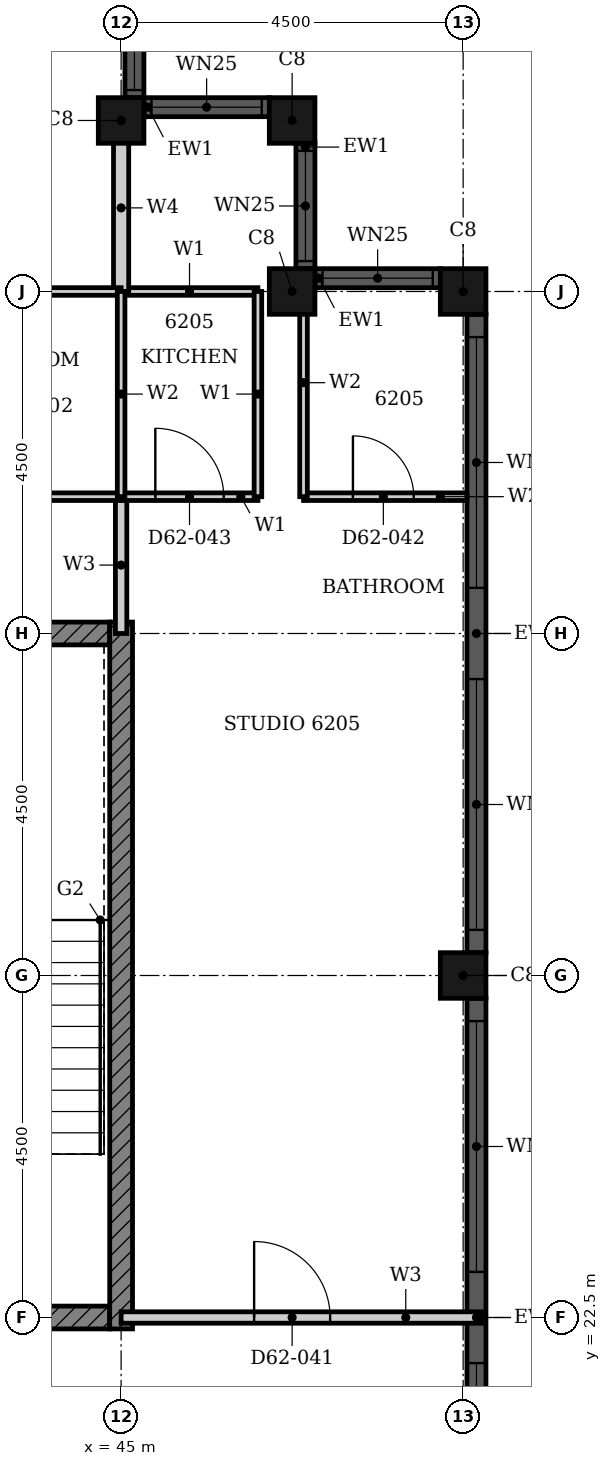
"""IFC4 building model, lengths in metres.
Left out: names, types, materials, properties, quantities, classifications, styles, units other than length and angle.
Written with IfcOpenShell. Run it as: python <this file> out.ifc"""

import sys

from ifc_helpers import new_model, si_unit, direction, frame, frame_2d, origin, origin_2d, place, context, subcontext, project, spatial, rectangle, hollow_rectangle, extrude, element, fill, save


model = new_model("IFC4")
c1 = context("Model", 3, precision=1e-05, world=origin(), true_north=direction((0.0, 1.0)))
c2 = subcontext(c1, "Body", "Model", "MODEL_VIEW")
j1 = project(units=[si_unit("LENGTHUNIT", "METRE"), si_unit("PLANEANGLEUNIT", "RADIAN")], contexts=[c1])
p1 = place(None, origin())
s1 = spatial("IfcSite", under=j1, at=p1, CompositionType="ELEMENT")
p2 = place(p1, origin())
s2 = spatial("IfcBuilding", under=s1, at=p2, CompositionType="ELEMENT")
p3 = place(p2, frame((0.0, 0.0, 245.3)))
s3 = spatial("IfcBuildingStorey", under=s2, at=p3, CompositionType="ELEMENT", Elevation=245.3)
for number, where, z_axis, x_axis in (
    (1, (49.5, 27.0, 0.0), (0.0, 0.0, 1.0), (1.0, 0.0, 0.0)),
    (2, (49.5, 36.0, 0.0), (0.0, 0.0, 1.0), (1.0, 0.0, 0.0)),
    (3, (47.25, 36.0, 0.0), (0.0, 0.0, 1.0), (1.0, 0.0, 0.0)),
    (4, (47.25, 38.25, 0.0), (0.0, 0.0, 1.0), (1.0, 0.0, 0.0)),
    (5, (45.0, 38.25, 0.0), (0.0, 0.0, 1.0), (1.0, 0.0, 0.0)),
):
    element("IfcColumn", number, at=place(p3, frame(where, z_axis=z_axis, x_axis=x_axis)), inside=s3, PredefinedType="COLUMN", context=c2, shape_type="SweptSolid", body=[
        extrude(hollow_rectangle(XDim=0.6, YDim=0.6, WallThickness=0.02, at=origin_2d()), origin(), (0.0, 0.0, 1.0), 3.7),
    ])
p4 = place(p3, frame((49.675, 18.3, 0.0), z_axis=(0.0, 0.0, 1.0), x_axis=(0.0, 1.0, 0.0)))
e6 = element("IfcWall", 6, at=p4, inside=s3, PredefinedType="SOLIDWALL", context=c2, shape_type="SweptSolid", body=[
    extrude(rectangle(XDim=8.4, YDim=0.25, at=frame_2d((4.2, 0.0))), origin(), (0.0, 0.0, 1.0), 3.7),
])
p5 = place(p4, frame((0.3, 0.0, 0.45)))
e7 = element("IfcOpeningElement", 7, at=p5, cuts=e6, PredefinedType="OPENING", context=c2, shape_type="SweptSolid", body=[
    extrude(rectangle(XDim=3.3, YDim=2.3, at=frame_2d((1.65, 1.15))), frame((0.0, 0.135, 0.0), z_axis=(0.0, -1.0, 0.0), x_axis=(1.0, 0.0, 0.0)), (0.0, 0.0, 1.0), 0.27),
])
p6 = place(p4, frame((4.8, 0.0, 0.45)))
e8 = element("IfcOpeningElement", 8, at=p6, cuts=e6, PredefinedType="OPENING", context=c2, shape_type="SweptSolid", body=[
    extrude(rectangle(XDim=3.3, YDim=2.3, at=frame_2d((1.65, 1.15))), frame((0.0, 0.135, 0.0), z_axis=(0.0, -1.0, 0.0), x_axis=(1.0, 0.0, 0.0)), (0.0, 0.0, 1.0), 0.27),
])
p7 = place(p3, frame((49.675, 27.3, 0.0), z_axis=(0.0, 0.0, 1.0), x_axis=(0.0, 1.0, 0.0)))
e9 = element("IfcWall", 9, at=p7, inside=s3, PredefinedType="SOLIDWALL", context=c2, shape_type="SweptSolid", body=[
    extrude(rectangle(XDim=8.4, YDim=0.25, at=frame_2d((4.2, 0.0))), origin(), (0.0, 0.0, 1.0), 3.7),
])
p8 = place(p7, frame((0.3, 0.0, 0.45)))
e10 = element("IfcOpeningElement", 10, at=p8, cuts=e9, PredefinedType="OPENING", context=c2, shape_type="SweptSolid", body=[
    extrude(rectangle(XDim=3.3, YDim=2.3, at=frame_2d((1.65, 1.15))), frame((0.0, 0.135, 0.0), z_axis=(0.0, -1.0, 0.0), x_axis=(1.0, 0.0, 0.0)), (0.0, 0.0, 1.0), 0.27),
])
p9 = place(p7, frame((4.8, 0.0, 0.45)))
e11 = element("IfcOpeningElement", 11, at=p9, cuts=e9, PredefinedType="OPENING", context=c2, shape_type="SweptSolid", body=[
    extrude(rectangle(XDim=3.3, YDim=2.3, at=frame_2d((1.65, 1.15))), frame((0.0, 0.135, 0.0), z_axis=(0.0, -1.0, 0.0), x_axis=(1.0, 0.0, 0.0)), (0.0, 0.0, 1.0), 0.27),
])
p10 = place(p3, frame((49.2, 36.175, 0.0), z_axis=(0.0, 0.0, 1.0), x_axis=(-1.0, 0.0, 0.0)))
e12 = element("IfcWall", 12, at=p10, inside=s3, PredefinedType="SOLIDWALL", context=c2, shape_type="SweptSolid", body=[
    extrude(rectangle(XDim=1.65, YDim=0.25, at=frame_2d((0.825, 0.0))), origin(), (0.0, 0.0, 1.0), 3.7),
])
p11 = place(p10, frame((0.1, 0.0, 0.9)))
e13 = element("IfcOpeningElement", 13, at=p11, cuts=e12, PredefinedType="OPENING", context=c2, shape_type="SweptSolid", body=[
    extrude(rectangle(XDim=1.45, YDim=1.85, at=frame_2d((0.725, 0.925))), frame((0.0, 0.135, 0.0), z_axis=(0.0, -1.0, 0.0), x_axis=(1.0, 0.0, 0.0)), (0.0, 0.0, 1.0), 0.27),
])
p12 = place(p3, frame((47.425, 36.3, 0.0), z_axis=(0.0, 0.0, 1.0), x_axis=(0.0, 1.0, 0.0)))
e14 = element("IfcWall", 14, at=p12, inside=s3, PredefinedType="SOLIDWALL", context=c2, shape_type="SweptSolid", body=[
    extrude(rectangle(XDim=1.65, YDim=0.25, at=frame_2d((0.825, 0.0))), origin(), (0.0, 0.0, 1.0), 3.7),
])
p13 = place(p12, frame((0.1, 0.0, 0.9)))
e15 = element("IfcOpeningElement", 15, at=p13, cuts=e14, PredefinedType="OPENING", context=c2, shape_type="SweptSolid", body=[
    extrude(rectangle(XDim=1.45, YDim=1.85, at=frame_2d((0.725, 0.925))), frame((0.0, 0.135, 0.0), z_axis=(0.0, -1.0, 0.0), x_axis=(1.0, 0.0, 0.0)), (0.0, 0.0, 1.0), 0.27),
])
p14 = place(p3, frame((46.95, 38.425, 0.0), z_axis=(0.0, 0.0, 1.0), x_axis=(-1.0, 0.0, 0.0)))
e16 = element("IfcWall", 16, at=p14, inside=s3, PredefinedType="SOLIDWALL", context=c2, shape_type="SweptSolid", body=[
    extrude(rectangle(XDim=1.65, YDim=0.25, at=frame_2d((0.825, 0.0))), origin(), (0.0, 0.0, 1.0), 3.7),
])
p15 = place(p14, frame((0.1, 0.0, 0.9)))
e17 = element("IfcOpeningElement", 17, at=p15, cuts=e16, PredefinedType="OPENING", context=c2, shape_type="SweptSolid", body=[
    extrude(rectangle(XDim=1.45, YDim=1.85, at=frame_2d((0.725, 0.925))), frame((0.0, 0.135, 0.0), z_axis=(0.0, -1.0, 0.0), x_axis=(1.0, 0.0, 0.0)), (0.0, 0.0, 1.0), 0.27),
])
p16 = place(p3, frame((45.175, 38.55, 0.0), z_axis=(0.0, 0.0, 1.0), x_axis=(0.0, 1.0, 0.0)))
e18 = element("IfcWall", 18, at=p16, inside=s3, PredefinedType="SOLIDWALL", context=c2, shape_type="SweptSolid", body=[
    extrude(rectangle(XDim=1.65, YDim=0.25, at=frame_2d((0.825, 0.0))), origin(), (0.0, 0.0, 1.0), 3.7),
])
p17 = place(p16, frame((0.1, 0.0, 0.9)))
e19 = element("IfcOpeningElement", 19, at=p17, cuts=e18, PredefinedType="OPENING", context=c2, shape_type="SweptSolid", body=[
    extrude(rectangle(XDim=1.45, YDim=1.85, at=frame_2d((0.725, 0.925))), frame((0.0, 0.135, 0.0), z_axis=(0.0, -1.0, 0.0), x_axis=(1.0, 0.0, 0.0)), (0.0, 0.0, 1.0), 0.27),
])
p18 = place(p3, frame((30.339, 22.5, 0.0), z_axis=(0.0, 0.0, 1.0), x_axis=(1.0, 0.0, 0.0)))
e20 = element("IfcWall", 20, at=p18, inside=s3, PredefinedType="SHEAR", context=c2, shape_type="SweptSolid", body=[
    extrude(rectangle(XDim=14.511, YDim=0.3, at=frame_2d((7.255, 0.0))), origin(), (0.0, 0.0, 1.0), 3.4),
])
p19 = place(p18, frame((7.975, 0.0, 0.0)))
e21 = element("IfcOpeningElement", 21, at=p19, cuts=e20, PredefinedType="OPENING", context=c2, shape_type="SweptSolid", body=[
    extrude(rectangle(XDim=1.8, YDim=2.1, at=frame_2d((0.9, 1.05))), frame((0.0, 0.16, 0.0), z_axis=(0.0, -1.0, 0.0), x_axis=(1.0, 0.0, 0.0)), (0.0, 0.0, 1.0), 0.32),
])
p20 = place(p3, frame((40.625, 31.5, 0.0), z_axis=(0.0, 0.0, 1.0), x_axis=(1.0, 0.0, 0.0)))
e22 = element("IfcWall", 22, at=p20, inside=s3, PredefinedType="SHEAR", context=c2, shape_type="SweptSolid", body=[
    extrude(rectangle(XDim=4.225, YDim=0.3, at=frame_2d((2.113, 0.0))), origin(), (0.0, 0.0, 1.0), 3.4),
])
p21 = place(p3, frame((45.0, 22.35, 0.0), z_axis=(0.0, 0.0, 1.0), x_axis=(0.0, 1.0, 0.0)))
e23 = element("IfcWall", 23, at=p21, inside=s3, PredefinedType="SHEAR", context=c2, shape_type="SweptSolid", body=[
    extrude(rectangle(XDim=9.3, YDim=0.3, at=frame_2d((4.65, 0.0))), origin(), (0.0, 0.0, 1.0), 3.4),
])
p22 = place(p3, frame((45.0, 22.5, 0.0), z_axis=(0.0, 0.0, 1.0), x_axis=(1.0, 0.0, 0.0)))
e24 = element("IfcWall", 24, at=p22, inside=s3, PredefinedType="PARTITIONING", context=c2, shape_type="SweptSolid", body=[
    extrude(rectangle(XDim=4.74, YDim=0.15, at=frame_2d((2.37, 0.0))), origin(), (0.0, 0.0, 1.0), 3.4),
])
p23 = place(p22, frame((1.75, 0.0, 0.0)))
e25 = element("IfcOpeningElement", 25, at=p23, cuts=e24, PredefinedType="OPENING", context=c2, shape_type="SweptSolid", body=[
    extrude(rectangle(XDim=1.0, YDim=2.2, at=frame_2d((0.5, 1.1))), frame((0.0, 0.085, 0.0), z_axis=(0.0, -1.0, 0.0), x_axis=(1.0, 0.0, 0.0)), (0.0, 0.0, 1.0), 0.17),
])
p24 = place(p3, frame((45.0, 31.5, 0.0), z_axis=(0.0, 0.0, 1.0), x_axis=(0.0, 1.0, 0.0)))
e26 = element("IfcWall", 26, at=p24, inside=s3, PredefinedType="PARTITIONING", context=c2, shape_type="SweptSolid", body=[
    extrude(rectangle(XDim=1.8, YDim=0.15, at=frame_2d((0.9, 0.0))), origin(), (0.0, 0.0, 1.0), 3.4),
])
p25 = place(p3, frame((45.0, 33.3, 0.0), z_axis=(0.0, 0.0, 1.0), x_axis=(1.0, 0.0, 0.0)))
e27 = element("IfcWall", 27, at=p25, inside=s3, PredefinedType="PARTITIONING", context=c2, shape_type="SweptSolid", body=[
    extrude(rectangle(XDim=1.8, YDim=0.1, at=frame_2d((0.9, 0.0))), origin(), (0.0, 0.0, 1.0), 3.4),
])
p26 = place(p25, frame((0.45, 0.0, 0.0)))
e28 = element("IfcOpeningElement", 28, at=p26, cuts=e27, PredefinedType="OPENING", context=c2, shape_type="SweptSolid", body=[
    extrude(rectangle(XDim=0.9, YDim=2.1, at=frame_2d((0.45, 1.05))), frame((0.0, 0.06, 0.0), z_axis=(0.0, -1.0, 0.0), x_axis=(1.0, 0.0, 0.0)), (0.0, 0.0, 1.0), 0.12),
])
p27 = place(p3, frame((45.0, 36.0, 0.0), z_axis=(0.0, 0.0, 1.0), x_axis=(1.0, 0.0, 0.0)))
e29 = element("IfcWall", 29, at=p27, inside=s3, PredefinedType="PARTITIONING", context=c2, shape_type="SweptSolid", body=[
    extrude(rectangle(XDim=1.8, YDim=0.1, at=frame_2d((0.9, 0.0))), origin(), (0.0, 0.0, 1.0), 3.4),
])
p28 = place(p3, frame((46.8, 33.3, 0.0), z_axis=(0.0, 0.0, 1.0), x_axis=(0.0, 1.0, 0.0)))
e30 = element("IfcWall", 30, at=p28, inside=s3, PredefinedType="PARTITIONING", context=c2, shape_type="SweptSolid", body=[
    extrude(rectangle(XDim=2.7, YDim=0.1, at=frame_2d((1.35, 0.0))), origin(), (0.0, 0.0, 1.0), 3.4),
])
p29 = place(p3, frame((45.0, 36.0, 0.0), z_axis=(0.0, 0.0, 1.0), x_axis=(0.0, 1.0, 0.0)))
e31 = element("IfcWall", 31, at=p29, inside=s3, PredefinedType="PARTITIONING", context=c2, shape_type="SweptSolid", body=[
    extrude(rectangle(XDim=2.2, YDim=0.2, at=frame_2d((1.1, 0.0))), origin(), (0.0, 0.0, 1.0), 3.4),
])
p30 = place(p3, frame((42.0, 33.3, 0.0), z_axis=(0.0, 0.0, 1.0), x_axis=(1.0, 0.0, 0.0)))
e32 = element("IfcWall", 32, at=p30, inside=s3, PredefinedType="PARTITIONING", context=c2, shape_type="SweptSolid", body=[
    extrude(rectangle(XDim=3.0, YDim=0.1, at=frame_2d((1.5, 0.0))), origin(), (0.0, 0.0, 1.0), 3.4),
])
p31 = place(p3, frame((47.4, 33.3, 0.0), z_axis=(0.0, 0.0, 1.0), x_axis=(1.0, 0.0, 0.0)))
e33 = element("IfcWall", 33, at=p31, inside=s3, PredefinedType="PARTITIONING", context=c2, shape_type="SweptSolid", body=[
    extrude(rectangle(XDim=2.15, YDim=0.1, at=frame_2d((1.075, 0.0))), origin(), (0.0, 0.0, 1.0), 3.4),
])
p32 = place(p31, frame((0.65, 0.0, 0.0)))
e34 = element("IfcOpeningElement", 34, at=p32, cuts=e33, PredefinedType="OPENING", context=c2, shape_type="SweptSolid", body=[
    extrude(rectangle(XDim=0.8, YDim=2.1, at=frame_2d((0.4, 1.05))), frame((0.0, 0.06, 0.0), z_axis=(0.0, -1.0, 0.0), x_axis=(1.0, 0.0, 0.0)), (0.0, 0.0, 1.0), 0.12),
])
p33 = place(p3, frame((42.0, 36.0, 0.0), z_axis=(0.0, 0.0, 1.0), x_axis=(1.0, 0.0, 0.0)))
e35 = element("IfcWall", 35, at=p33, inside=s3, PredefinedType="PARTITIONING", context=c2, shape_type="SweptSolid", body=[
    extrude(rectangle(XDim=3.0, YDim=0.1, at=frame_2d((1.5, 0.0))), origin(), (0.0, 0.0, 1.0), 3.4),
])
p34 = place(p3, frame((45.0, 33.3, 0.0), z_axis=(0.0, 0.0, 1.0), x_axis=(0.0, 1.0, 0.0)))
e36 = element("IfcWall", 36, at=p34, inside=s3, PredefinedType="PARTITIONING", context=c2, shape_type="SweptSolid", body=[
    extrude(rectangle(XDim=2.7, YDim=0.1, at=frame_2d((1.35, 0.0))), origin(), (0.0, 0.0, 1.0), 3.4),
])
p35 = place(p3, frame((47.4, 33.3, 0.0), z_axis=(0.0, 0.0, 1.0), x_axis=(0.0, 1.0, 0.0)))
e37 = element("IfcWall", 37, at=p35, inside=s3, PredefinedType="PARTITIONING", context=c2, shape_type="SweptSolid", body=[
    extrude(rectangle(XDim=3.0, YDim=0.1, at=frame_2d((1.5, 0.0))), origin(), (0.0, 0.0, 1.0), 3.4),
])
p36 = place(p5, origin())
e38 = element("IfcWindow", 38, at=p36, inside=s3, PartitioningType="SINGLE_PANEL", PredefinedType="WINDOW", context=c2, shape_type="SweptSolid", body=[
    extrude(rectangle(XDim=3.3, YDim=2.3, at=frame_2d((1.65, 1.15))), frame((0.0, 0.03, 0.0), z_axis=(0.0, -1.0, 0.0), x_axis=(1.0, 0.0, 0.0)), (0.0, 0.0, 1.0), 0.06),
])
fill(e7, e38)
p37 = place(p6, origin())
e39 = element("IfcWindow", 39, at=p37, inside=s3, PartitioningType="SINGLE_PANEL", PredefinedType="WINDOW", context=c2, shape_type="SweptSolid", body=[
    extrude(rectangle(XDim=3.3, YDim=2.3, at=frame_2d((1.65, 1.15))), frame((0.0, 0.03, 0.0), z_axis=(0.0, -1.0, 0.0), x_axis=(1.0, 0.0, 0.0)), (0.0, 0.0, 1.0), 0.06),
])
fill(e8, e39)
p38 = place(p8, origin())
e40 = element("IfcWindow", 40, at=p38, inside=s3, PartitioningType="SINGLE_PANEL", PredefinedType="WINDOW", context=c2, shape_type="SweptSolid", body=[
    extrude(rectangle(XDim=3.3, YDim=2.3, at=frame_2d((1.65, 1.15))), frame((0.0, 0.03, 0.0), z_axis=(0.0, -1.0, 0.0), x_axis=(1.0, 0.0, 0.0)), (0.0, 0.0, 1.0), 0.06),
])
fill(e10, e40)
p39 = place(p9, origin())
e41 = element("IfcWindow", 41, at=p39, inside=s3, PartitioningType="SINGLE_PANEL", PredefinedType="WINDOW", context=c2, shape_type="SweptSolid", body=[
    extrude(rectangle(XDim=3.3, YDim=2.3, at=frame_2d((1.65, 1.15))), frame((0.0, 0.03, 0.0), z_axis=(0.0, -1.0, 0.0), x_axis=(1.0, 0.0, 0.0)), (0.0, 0.0, 1.0), 0.06),
])
fill(e11, e41)
p40 = place(p11, origin())
e42 = element("IfcWindow", 42, at=p40, inside=s3, PartitioningType="SINGLE_PANEL", PredefinedType="WINDOW", context=c2, shape_type="SweptSolid", body=[
    extrude(rectangle(XDim=1.45, YDim=1.85, at=frame_2d((0.725, 0.925))), frame((0.0, 0.03, 0.0), z_axis=(0.0, -1.0, 0.0), x_axis=(1.0, 0.0, 0.0)), (0.0, 0.0, 1.0), 0.06),
])
fill(e13, e42)
p41 = place(p13, origin())
e43 = element("IfcWindow", 43, at=p41, inside=s3, PartitioningType="SINGLE_PANEL", PredefinedType="WINDOW", context=c2, shape_type="SweptSolid", body=[
    extrude(rectangle(XDim=1.45, YDim=1.85, at=frame_2d((0.725, 0.925))), frame((0.0, 0.03, 0.0), z_axis=(0.0, -1.0, 0.0), x_axis=(1.0, 0.0, 0.0)), (0.0, 0.0, 1.0), 0.06),
])
fill(e15, e43)
p42 = place(p15, origin())
e44 = element("IfcWindow", 44, at=p42, inside=s3, PartitioningType="SINGLE_PANEL", PredefinedType="WINDOW", context=c2, shape_type="SweptSolid", body=[
    extrude(rectangle(XDim=1.45, YDim=1.85, at=frame_2d((0.725, 0.925))), frame((0.0, 0.03, 0.0), z_axis=(0.0, -1.0, 0.0), x_axis=(1.0, 0.0, 0.0)), (0.0, 0.0, 1.0), 0.06),
])
fill(e17, e44)
p43 = place(p17, origin())
e45 = element("IfcWindow", 45, at=p43, inside=s3, PartitioningType="SINGLE_PANEL", PredefinedType="WINDOW", context=c2, shape_type="SweptSolid", body=[
    extrude(rectangle(XDim=1.45, YDim=1.85, at=frame_2d((0.725, 0.925))), frame((0.0, 0.03, 0.0), z_axis=(0.0, -1.0, 0.0), x_axis=(1.0, 0.0, 0.0)), (0.0, 0.0, 1.0), 0.06),
])
fill(e19, e45)
p44 = place(p23, origin())
e46 = element("IfcDoor", 46, at=p44, inside=s3, OperationType="SINGLE_SWING_LEFT", PredefinedType="DOOR", context=c2, shape_type="SweptSolid", body=[
    extrude(rectangle(XDim=1.0, YDim=2.2, at=frame_2d((0.5, 1.1))), frame((0.0, 0.025, 0.0), z_axis=(0.0, -1.0, 0.0), x_axis=(1.0, 0.0, 0.0)), (0.0, 0.0, 1.0), 0.05),
])
fill(e25, e46)
p45 = place(p32, origin())
e47 = element("IfcDoor", 47, at=p45, inside=s3, OperationType="SINGLE_SWING_LEFT", PredefinedType="DOOR", context=c2, shape_type="SweptSolid", body=[
    extrude(rectangle(XDim=0.8, YDim=2.1, at=frame_2d((0.4, 1.05))), frame((0.0, 0.025, 0.0), z_axis=(0.0, -1.0, 0.0), x_axis=(1.0, 0.0, 0.0)), (0.0, 0.0, 1.0), 0.05),
])
fill(e34, e47)
p46 = place(p26, origin())
e48 = element("IfcDoor", 48, at=p46, inside=s3, OperationType="SINGLE_SWING_RIGHT", PredefinedType="DOOR", context=c2, shape_type="SweptSolid", body=[
    extrude(rectangle(XDim=0.9, YDim=2.1, at=frame_2d((0.45, 1.05))), frame((0.0, 0.025, 0.0), z_axis=(0.0, -1.0, 0.0), x_axis=(1.0, 0.0, 0.0)), (0.0, 0.0, 1.0), 0.05),
])
fill(e28, e48)
save(model, sys.argv[1])
